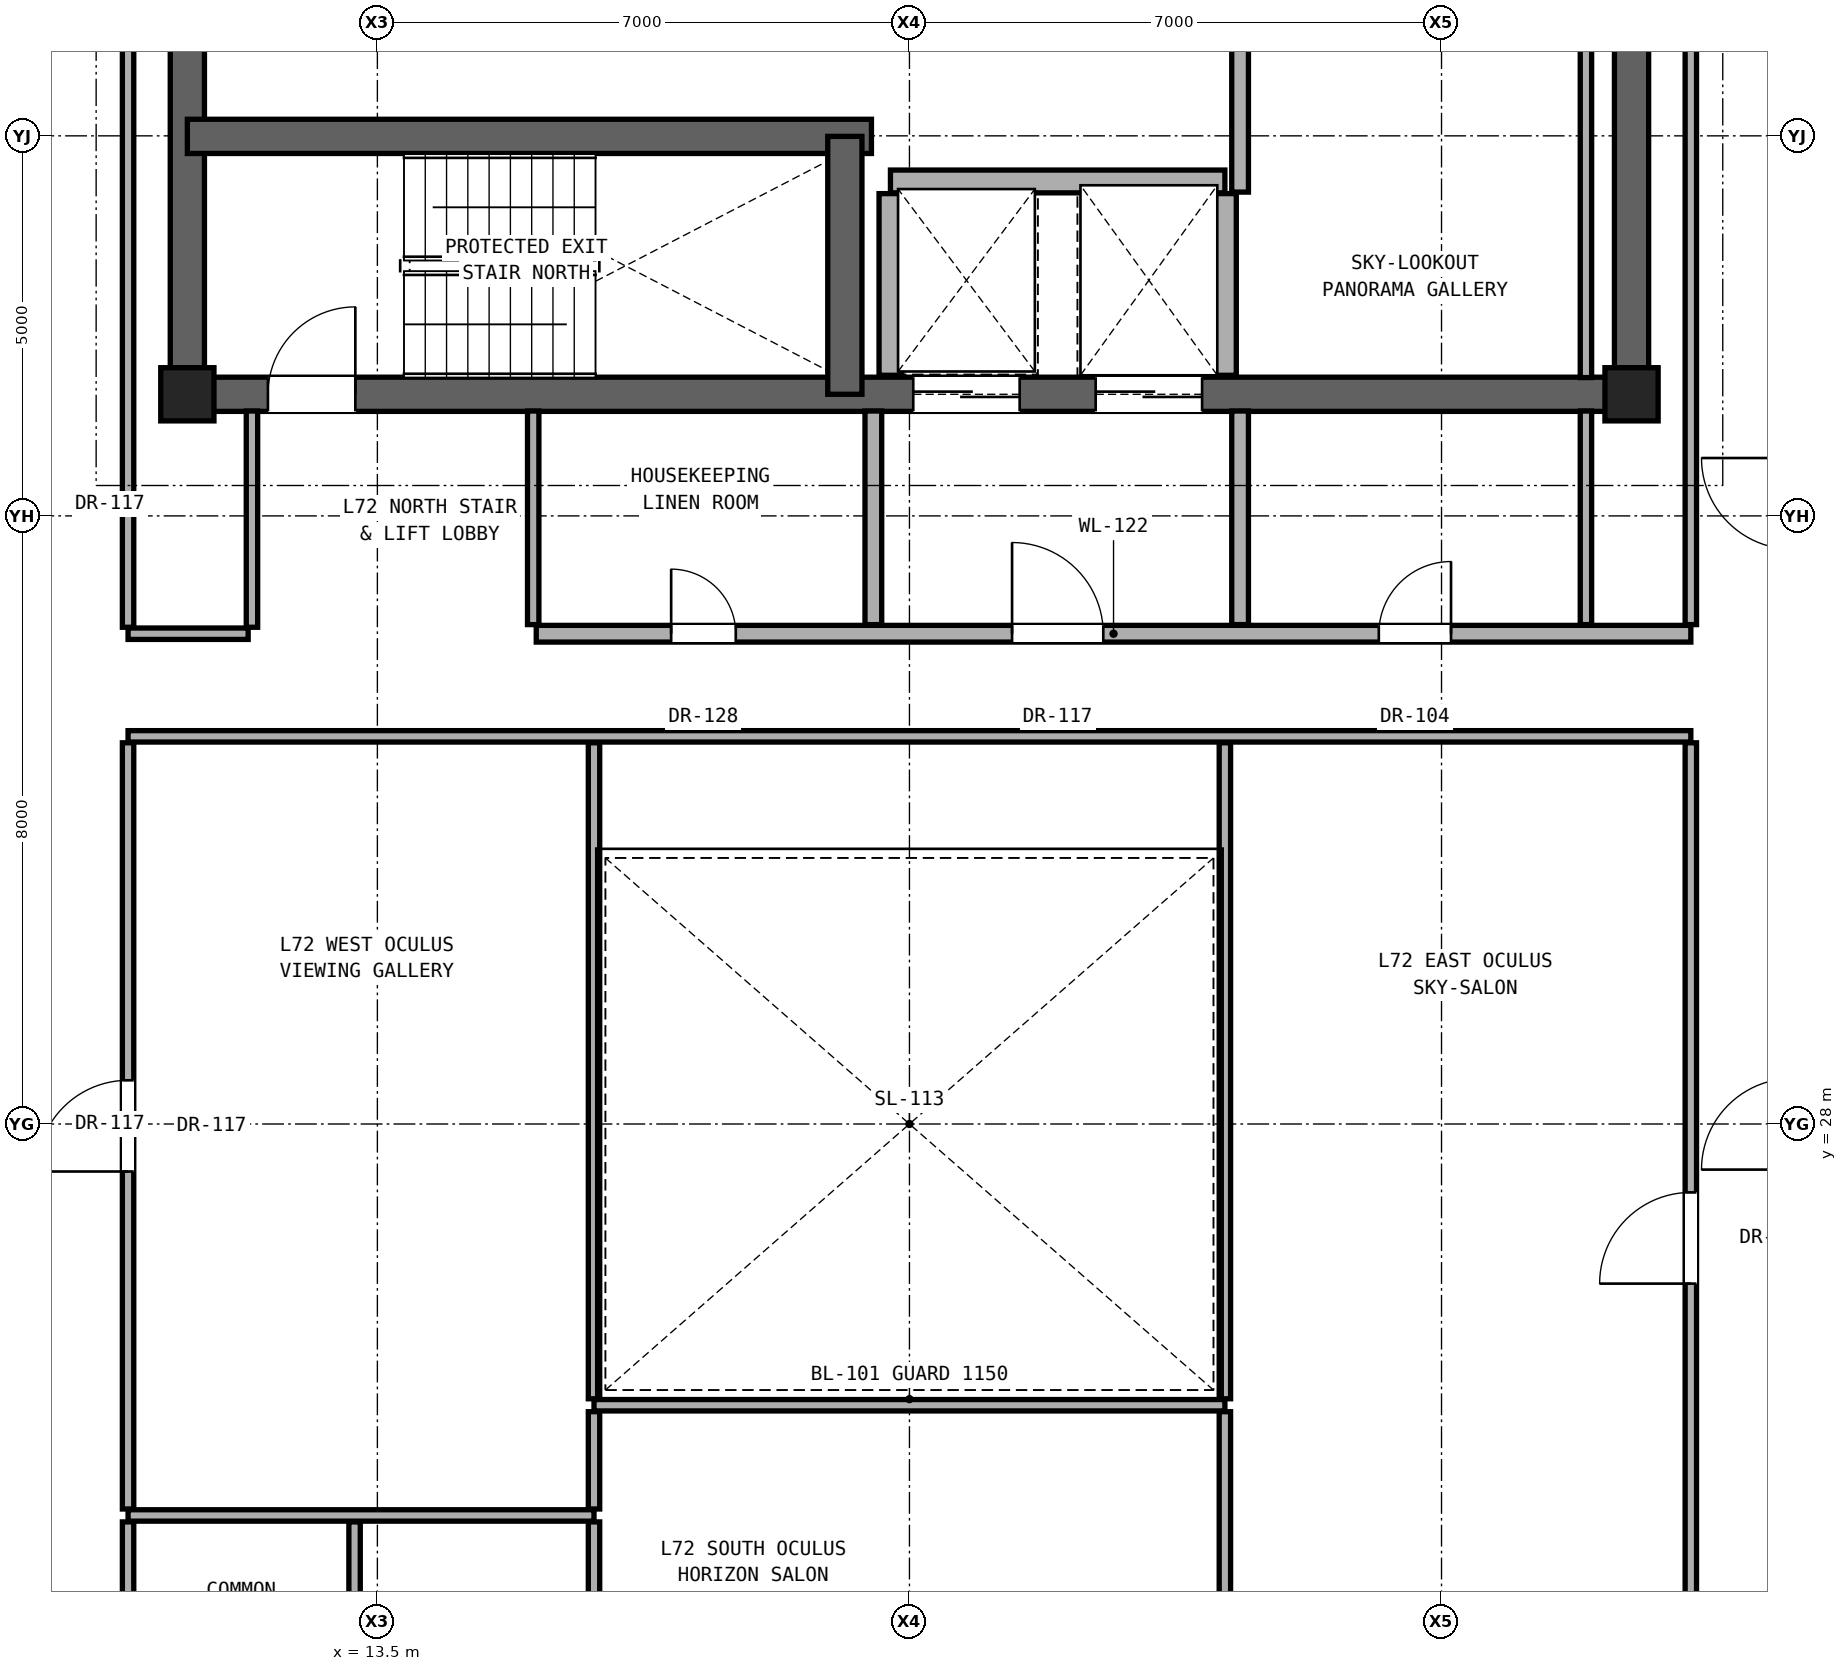
"""IFC4 building model, lengths in metres.
Left out: names, types, materials, properties, quantities, classifications, styles, units other than length and angle.
Written with IfcOpenShell. Run it as: python <this file> out.ifc"""

import sys

from ifc_helpers import new_model, si_unit, direction, frame, frame_2d, origin, origin_2d, place, context, subcontext, project, spatial, rectangle, extrude, element, fill, save


model = new_model("IFC4")
c1 = context("Model", 3, precision=1e-05, world=origin(), true_north=direction((0.0, 1.0)))
c2 = subcontext(c1, "Body", "Model", "MODEL_VIEW")
j1 = project(units=[si_unit("LENGTHUNIT", "METRE"), si_unit("PLANEANGLEUNIT", "RADIAN")], contexts=[c1])
p1 = place(None, origin())
s1 = spatial("IfcSite", under=j1, at=p1, CompositionType="ELEMENT")
p2 = place(p1, origin())
s2 = spatial("IfcBuilding", under=s1, at=p2, CompositionType="ELEMENT")
p3 = place(p2, frame((0.0, 0.0, 252.7)))
s3 = spatial("IfcBuildingStorey", under=s2, at=p3, CompositionType="ELEMENT", Elevation=252.7)
for number, where, z_axis, x_axis in (
    (1, (11.0, 37.6, 0.0), (0.0, 0.0, 1.0), (1.0, 0.0, 0.0)),
    (2, (30.0, 37.6, 0.0), (0.0, 0.0, 1.0), (1.0, 0.0, 0.0)),
):
    element("IfcColumn", number, at=place(p3, frame(where, z_axis=z_axis, x_axis=x_axis)), inside=s3, PredefinedType="COLUMN", context=c2, shape_type="SweptSolid", body=[
        extrude(rectangle(XDim=0.7, YDim=0.7, at=origin_2d()), origin(), (0.0, 0.0, 1.0), 3.6),
    ])
for number, where, z_axis, x_axis in (
    (3, (11.0, 37.6, 0.0), (0.0, 0.0, 1.0), (0.0, 1.0, 0.0)),
    (4, (30.0, 37.6, 0.0), (0.0, 0.0, 1.0), (0.0, 1.0, 0.0)),
):
    element("IfcWall", number, at=place(p3, frame(where, z_axis=z_axis, x_axis=x_axis)), inside=s3, PredefinedType="SHEAR", context=c2, shape_type="SweptSolid", body=[
        extrude(rectangle(XDim=6.0, YDim=0.45, at=frame_2d((3.0, 0.0))), origin(), (0.0, 0.0, 1.0), 3.4),
    ])
p4 = place(p3, frame((11.0, 37.6, 0.0), z_axis=(0.0, 0.0, 1.0), x_axis=(1.0, 0.0, 0.0)))
e5 = element("IfcWall", 5, at=p4, inside=s3, PredefinedType="SHEAR", context=c2, shape_type="SweptSolid", body=[
    extrude(rectangle(XDim=19.0, YDim=0.45, at=frame_2d((9.5, 0.0))), origin(), (0.0, 0.0, 1.0), 3.4),
])
p5 = place(p4, frame((1.06, 0.0, 0.0)))
e6 = element("IfcOpeningElement", 6, at=p5, cuts=e5, PredefinedType="OPENING", context=c2, shape_type="SweptSolid", body=[
    extrude(rectangle(XDim=1.15, YDim=2.2, at=frame_2d((0.575, 1.1))), frame((0.0, 0.235, 0.0), z_axis=(0.0, -1.0, 0.0), x_axis=(1.0, 0.0, 0.0)), (0.0, 0.0, 1.0), 0.47),
])
p6 = place(p4, frame((9.55, 0.0, 0.0)))
e7 = element("IfcOpeningElement", 7, at=p6, cuts=e5, PredefinedType="OPENING", context=c2, shape_type="SweptSolid", body=[
    extrude(rectangle(XDim=1.4, YDim=2.35, at=frame_2d((0.7, 1.175))), frame((0.0, 0.235, 0.0), z_axis=(0.0, -1.0, 0.0), x_axis=(1.0, 0.0, 0.0)), (0.0, 0.0, 1.0), 0.47),
])
p7 = place(p4, frame((11.95, 0.0, 0.0)))
e8 = element("IfcOpeningElement", 8, at=p7, cuts=e5, PredefinedType="OPENING", context=c2, shape_type="SweptSolid", body=[
    extrude(rectangle(XDim=1.4, YDim=2.35, at=frame_2d((0.7, 1.175))), frame((0.0, 0.235, 0.0), z_axis=(0.0, -1.0, 0.0), x_axis=(1.0, 0.0, 0.0)), (0.0, 0.0, 1.0), 0.47),
])
p8 = place(p3, frame((11.0, 40.993, 0.0), z_axis=(0.0, 0.0, 1.0), x_axis=(1.0, 0.0, 0.0)))
e9 = element("IfcWall", 9, at=p8, inside=s3, PredefinedType="SHEAR", context=c2, shape_type="SweptSolid", body=[
    extrude(rectangle(XDim=9.0, YDim=0.45, at=frame_2d((4.5, 0.0))), origin(), (0.0, 0.0, 1.0), 3.4),
])
p9 = place(p3, frame((19.65, 37.6, 0.0), z_axis=(0.0, 0.0, 1.0), x_axis=(0.0, 1.0, 0.0)))
e10 = element("IfcWall", 10, at=p9, inside=s3, PredefinedType="SHEAR", context=c2, shape_type="SweptSolid", body=[
    extrude(rectangle(XDim=3.393, YDim=0.45, at=frame_2d((1.696, 0.0))), origin(), (0.0, 0.0, 1.0), 3.4),
])
p10 = place(p3, frame((10.22, 22.85, 0.0), z_axis=(0.0, 0.0, 1.0), x_axis=(1.0, 0.0, 0.0)))
e11 = element("IfcWall", 11, at=p10, inside=s3, PredefinedType="PARTITIONING", context=c2, shape_type="SweptSolid", body=[
    extrude(rectangle(XDim=6.13, YDim=0.15, at=frame_2d((3.065, 0.0))), origin(), (0.0, 0.0, 1.0), 2.536),
])
p11 = place(p3, frame((16.35, 24.3, 0.0), z_axis=(0.0, 0.0, 1.0), x_axis=(1.0, 0.0, 0.0)))
e12 = element("IfcWall", 12, at=p11, inside=s3, PredefinedType="PARTITIONING", context=c2, shape_type="SweptSolid", body=[
    extrude(rectangle(XDim=8.3, YDim=0.15, at=frame_2d((4.15, 0.0))), origin(), (0.0, 0.0, 1.0), 2.975),
])
p12 = place(p3, frame((10.22, 33.1, 0.0), z_axis=(0.0, 0.0, 1.0), x_axis=(1.0, 0.0, 0.0)))
e13 = element("IfcWall", 13, at=p12, inside=s3, PredefinedType="PARTITIONING", context=c2, shape_type="SweptSolid", body=[
    extrude(rectangle(XDim=20.56, YDim=0.15, at=frame_2d((10.28, 0.0))), origin(), (0.0, 0.0, 1.0), 2.536),
])
p13 = place(p3, frame((10.22, 34.45, 0.0), z_axis=(0.0, 0.0, 1.0), x_axis=(1.0, 0.0, 0.0)))
e14 = element("IfcWall", 14, at=p13, inside=s3, PredefinedType="PARTITIONING", context=c2, shape_type="SweptSolid", body=[
    extrude(rectangle(XDim=1.58, YDim=0.15, at=frame_2d((0.79, 0.0))), origin(), (0.0, 0.0, 1.0), 2.536),
])
p14 = place(p3, frame((15.59, 34.45, 0.0), z_axis=(0.0, 0.0, 1.0), x_axis=(1.0, 0.0, 0.0)))
e15 = element("IfcWall", 15, at=p14, inside=s3, PredefinedType="SOLIDWALL", context=c2, shape_type="SweptSolid", body=[
    extrude(rectangle(XDim=15.19, YDim=0.22, at=frame_2d((7.595, 0.0))), origin(), (0.0, 0.0, 1.0), 2.536),
])
p15 = place(p14, frame((6.26, 0.0, 0.0)))
e16 = element("IfcOpeningElement", 16, at=p15, cuts=e15, PredefinedType="OPENING", context=c2, shape_type="SweptSolid", body=[
    extrude(rectangle(XDim=1.2, YDim=2.25, at=frame_2d((0.6, 1.125))), frame((0.0, 0.12, 0.0), z_axis=(0.0, -1.0, 0.0), x_axis=(1.0, 0.0, 0.0)), (0.0, 0.0, 1.0), 0.24),
])
p16 = place(p14, frame((11.085, 0.0, 0.0)))
e17 = element("IfcOpeningElement", 17, at=p16, cuts=e15, PredefinedType="OPENING", context=c2, shape_type="SweptSolid", body=[
    extrude(rectangle(XDim=0.95, YDim=2.15, at=frame_2d((0.475, 1.075))), frame((0.0, 0.12, 0.0), z_axis=(0.0, -1.0, 0.0), x_axis=(1.0, 0.0, 0.0)), (0.0, 0.0, 1.0), 0.24),
])
p17 = place(p14, frame((1.775, 0.0, 0.0)))
e18 = element("IfcOpeningElement", 18, at=p17, cuts=e15, PredefinedType="OPENING", context=c2, shape_type="SweptSolid", body=[
    extrude(rectangle(XDim=0.85, YDim=2.01, at=frame_2d((0.425, 1.005))), frame((0.0, 0.12, 0.0), z_axis=(0.0, -1.0, 0.0), x_axis=(1.0, 0.0, 0.0)), (0.0, 0.0, 1.0), 0.24),
])
p18 = place(p3, frame((20.25, 40.4, 0.0), z_axis=(0.0, 0.0, 1.0), x_axis=(1.0, 0.0, 0.0)))
e19 = element("IfcWall", 19, at=p18, inside=s3, PredefinedType="SOLIDWALL", context=c2, shape_type="SweptSolid", body=[
    extrude(rectangle(XDim=4.4, YDim=0.3, at=frame_2d((2.2, 0.0))), origin(), (0.0, 0.0, 1.0), 3.4),
])
p19 = place(p3, frame((10.22, 19.985, 0.0), z_axis=(0.0, 0.0, 1.0), x_axis=(0.0, 1.0, 0.0)))
e20 = element("IfcWall", 20, at=p19, inside=s3, PredefinedType="PARTITIONING", context=c2, shape_type="SweptSolid", body=[
    extrude(rectangle(XDim=2.78, YDim=0.15, at=frame_2d((1.39, 0.0))), origin(), (0.0, 0.0, 1.0), 3.4),
])
p20 = place(p3, frame((10.22, 22.935, 0.0), z_axis=(0.0, 0.0, 1.0), x_axis=(0.0, 1.0, 0.0)))
e21 = element("IfcWall", 21, at=p20, inside=s3, PredefinedType="PARTITIONING", context=c2, shape_type="SweptSolid", body=[
    extrude(rectangle(XDim=10.08, YDim=0.15, at=frame_2d((5.04, 0.0))), origin(), (0.0, 0.0, 1.0), 2.696),
])
p21 = place(p20, frame((4.44, 0.0, 0.0)))
e22 = element("IfcOpeningElement", 22, at=p21, cuts=e21, PredefinedType="OPENING", context=c2, shape_type="SweptSolid", body=[
    extrude(rectangle(XDim=1.2, YDim=2.25, at=frame_2d((0.6, 1.125))), frame((0.0, 0.085, 0.0), z_axis=(0.0, -1.0, 0.0), x_axis=(1.0, 0.0, 0.0)), (0.0, 0.0, 1.0), 0.17),
])
p22 = place(p3, frame((10.22, 34.535, 0.0), z_axis=(0.0, 0.0, 1.0), x_axis=(0.0, 1.0, 0.0)))
e23 = element("IfcWall", 23, at=p22, inside=s3, PredefinedType="PARTITIONING", context=c2, shape_type="SweptSolid", body=[
    extrude(rectangle(XDim=9.13, YDim=0.15, at=frame_2d((4.565, 0.0))), origin(), (0.0, 0.0, 1.0), 2.792),
])
p23 = place(p3, frame((11.85, 34.535, 0.0), z_axis=(0.0, 0.0, 1.0), x_axis=(0.0, 1.0, 0.0)))
e24 = element("IfcWall", 24, at=p23, inside=s3, PredefinedType="PARTITIONING", context=c2, shape_type="SweptSolid", body=[
    extrude(rectangle(XDim=2.845, YDim=0.15, at=frame_2d((1.422, 0.0))), origin(), (0.0, 0.0, 1.0), 3.4),
])
p24 = place(p3, frame((13.2, 19.985, 0.0), z_axis=(0.0, 0.0, 1.0), x_axis=(0.0, 1.0, 0.0)))
e25 = element("IfcWall", 25, at=p24, inside=s3, PredefinedType="PARTITIONING", context=c2, shape_type="SweptSolid", body=[
    extrude(rectangle(XDim=2.78, YDim=0.15, at=frame_2d((1.39, 0.0))), origin(), (0.0, 0.0, 1.0), 3.4),
])
p25 = place(p3, frame((15.55, 34.57, 0.0), z_axis=(0.0, 0.0, 1.0), x_axis=(0.0, 1.0, 0.0)))
e26 = element("IfcWall", 26, at=p25, inside=s3, PredefinedType="PARTITIONING", context=c2, shape_type="SweptSolid", body=[
    extrude(rectangle(XDim=2.81, YDim=0.15, at=frame_2d((1.405, 0.0))), origin(), (0.0, 0.0, 1.0), 3.4),
])
p26 = place(p3, frame((16.35, 19.985, 0.0), z_axis=(0.0, 0.0, 1.0), x_axis=(0.0, 1.0, 0.0)))
e27 = element("IfcWall", 27, at=p26, inside=s3, PredefinedType="PARTITIONING", context=c2, shape_type="SweptSolid", body=[
    extrude(rectangle(XDim=2.78, YDim=0.15, at=frame_2d((1.39, 0.0))), origin(), (0.0, 0.0, 1.0), 3.4),
])
p27 = place(p3, frame((16.35, 22.935, 0.0), z_axis=(0.0, 0.0, 1.0), x_axis=(0.0, 1.0, 0.0)))
e28 = element("IfcWall", 28, at=p27, inside=s3, PredefinedType="PARTITIONING", context=c2, shape_type="SweptSolid", body=[
    extrude(rectangle(XDim=1.28, YDim=0.15, at=frame_2d((0.64, 0.0))), origin(), (0.0, 0.0, 1.0), 3.4),
])
p28 = place(p3, frame((16.35, 24.385, 0.0), z_axis=(0.0, 0.0, 1.0), x_axis=(0.0, 1.0, 0.0)))
e29 = element("IfcWall", 29, at=p28, inside=s3, PredefinedType="PARTITIONING", context=c2, shape_type="SweptSolid", body=[
    extrude(rectangle(XDim=8.63, YDim=0.15, at=frame_2d((4.315, 0.0))), origin(), (0.0, 0.0, 1.0), 2.536),
])
p29 = place(p3, frame((20.025, 34.57, 0.0), z_axis=(0.0, 0.0, 1.0), x_axis=(0.0, 1.0, 0.0)))
e30 = element("IfcWall", 30, at=p29, inside=s3, PredefinedType="SOLIDWALL", context=c2, shape_type="SweptSolid", body=[
    extrude(rectangle(XDim=2.81, YDim=0.22, at=frame_2d((1.405, 0.0))), origin(), (0.0, 0.0, 1.0), 3.4),
])
p30 = place(p3, frame((20.25, 37.85, 0.0), z_axis=(0.0, 0.0, 1.0), x_axis=(0.0, 1.0, 0.0)))
e31 = element("IfcWall", 31, at=p30, inside=s3, PredefinedType="SOLIDWALL", context=c2, shape_type="SweptSolid", body=[
    extrude(rectangle(XDim=2.39, YDim=0.3, at=frame_2d((1.195, 0.0))), origin(), (0.0, 0.0, 1.0), 3.4),
])
p31 = place(p3, frame((24.65, 19.985, 0.0), z_axis=(0.0, 0.0, 1.0), x_axis=(0.0, 1.0, 0.0)))
e32 = element("IfcWall", 32, at=p31, inside=s3, PredefinedType="PARTITIONING", context=c2, shape_type="SweptSolid", body=[
    extrude(rectangle(XDim=4.23, YDim=0.15, at=frame_2d((2.115, 0.0))), origin(), (0.0, 0.0, 1.0), 3.4),
])
p32 = place(p3, frame((24.65, 24.385, 0.0), z_axis=(0.0, 0.0, 1.0), x_axis=(0.0, 1.0, 0.0)))
e33 = element("IfcWall", 33, at=p32, inside=s3, PredefinedType="PARTITIONING", context=c2, shape_type="SweptSolid", body=[
    extrude(rectangle(XDim=8.63, YDim=0.15, at=frame_2d((4.315, 0.0))), origin(), (0.0, 0.0, 1.0), 2.536),
])
p33 = place(p3, frame((24.65, 37.85, 0.0), z_axis=(0.0, 0.0, 1.0), x_axis=(0.0, 1.0, 0.0)))
e34 = element("IfcWall", 34, at=p33, inside=s3, PredefinedType="SOLIDWALL", context=c2, shape_type="SweptSolid", body=[
    extrude(rectangle(XDim=2.39, YDim=0.3, at=frame_2d((1.195, 0.0))), origin(), (0.0, 0.0, 1.0), 3.4),
])
p34 = place(p3, frame((24.85, 34.57, 0.0), z_axis=(0.0, 0.0, 1.0), x_axis=(0.0, 1.0, 0.0)))
e35 = element("IfcWall", 35, at=p34, inside=s3, PredefinedType="SOLIDWALL", context=c2, shape_type="SweptSolid", body=[
    extrude(rectangle(XDim=2.81, YDim=0.22, at=frame_2d((1.405, 0.0))), origin(), (0.0, 0.0, 1.0), 3.4),
])
p35 = place(p3, frame((24.85, 40.26, 0.0), z_axis=(0.0, 0.0, 1.0), x_axis=(0.0, 1.0, 0.0)))
e36 = element("IfcWall", 36, at=p35, inside=s3, PredefinedType="SOLIDWALL", context=c2, shape_type="SweptSolid", body=[
    extrude(rectangle(XDim=2.855, YDim=0.22, at=frame_2d((1.427, 0.0))), origin(), (0.0, 0.0, 1.0), 3.4),
])
p36 = place(p3, frame((29.4, 34.57, 0.0), z_axis=(0.0, 0.0, 1.0), x_axis=(0.0, 1.0, 0.0)))
e37 = element("IfcWall", 37, at=p36, inside=s3, PredefinedType="PARTITIONING", context=c2, shape_type="SweptSolid", body=[
    extrude(rectangle(XDim=2.81, YDim=0.15, at=frame_2d((1.405, 0.0))), origin(), (0.0, 0.0, 1.0), 3.4),
])
p37 = place(p3, frame((29.4, 37.82, 0.0), z_axis=(0.0, 0.0, 1.0), x_axis=(0.0, 1.0, 0.0)))
e38 = element("IfcWall", 38, at=p37, inside=s3, PredefinedType="PARTITIONING", context=c2, shape_type="SweptSolid", body=[
    extrude(rectangle(XDim=5.295, YDim=0.15, at=frame_2d((2.647, 0.0))), origin(), (0.0, 0.0, 1.0), 3.4),
])
p38 = place(p3, frame((30.78, 19.985, 0.0), z_axis=(0.0, 0.0, 1.0), x_axis=(0.0, 1.0, 0.0)))
e39 = element("IfcWall", 39, at=p38, inside=s3, PredefinedType="PARTITIONING", context=c2, shape_type="SweptSolid", body=[
    extrude(rectangle(XDim=13.03, YDim=0.15, at=frame_2d((6.515, 0.0))), origin(), (0.0, 0.0, 1.0), 2.696),
])
p39 = place(p38, frame((5.915, 0.0, 0.0)))
e40 = element("IfcOpeningElement", 40, at=p39, cuts=e39, PredefinedType="OPENING", context=c2, shape_type="SweptSolid", body=[
    extrude(rectangle(XDim=1.2, YDim=2.25, at=frame_2d((0.6, 1.125))), frame((0.0, 0.085, 0.0), z_axis=(0.0, -1.0, 0.0), x_axis=(1.0, 0.0, 0.0)), (0.0, 0.0, 1.0), 0.17),
])
p40 = place(p3, frame((30.78, 34.57, 0.0), z_axis=(0.0, 0.0, 1.0), x_axis=(0.0, 1.0, 0.0)))
e41 = element("IfcWall", 41, at=p40, inside=s3, PredefinedType="PARTITIONING", context=c2, shape_type="SweptSolid", body=[
    extrude(rectangle(XDim=9.095, YDim=0.15, at=frame_2d((4.547, 0.0))), origin(), (0.0, 0.0, 1.0), 2.792),
])
p41 = place(p5, origin())
e42 = element("IfcDoor", 42, at=p41, inside=s3, OperationType="SINGLE_SWING_RIGHT", PredefinedType="DOOR", context=c2, shape_type="SweptSolid", body=[
    extrude(rectangle(XDim=1.15, YDim=2.2, at=frame_2d((0.575, 1.1))), frame((0.0, 0.025, 0.0), z_axis=(0.0, -1.0, 0.0), x_axis=(1.0, 0.0, 0.0)), (0.0, 0.0, 1.0), 0.05),
])
fill(e6, e42)
p42 = place(p15, origin())
e43 = element("IfcDoor", 43, at=p42, inside=s3, OperationType="SINGLE_SWING_LEFT", PredefinedType="DOOR", context=c2, shape_type="SweptSolid", body=[
    extrude(rectangle(XDim=1.2, YDim=2.25, at=frame_2d((0.6, 1.125))), frame((0.0, 0.025, 0.0), z_axis=(0.0, -1.0, 0.0), x_axis=(1.0, 0.0, 0.0)), (0.0, 0.0, 1.0), 0.05),
])
fill(e16, e43)
p43 = place(p16, origin())
e44 = element("IfcDoor", 44, at=p43, inside=s3, OperationType="SINGLE_SWING_RIGHT", PredefinedType="DOOR", context=c2, shape_type="SweptSolid", body=[
    extrude(rectangle(XDim=0.95, YDim=2.15, at=frame_2d((0.475, 1.075))), frame((0.0, 0.025, 0.0), z_axis=(0.0, -1.0, 0.0), x_axis=(1.0, 0.0, 0.0)), (0.0, 0.0, 1.0), 0.05),
])
fill(e17, e44)
p44 = place(p17, origin())
e45 = element("IfcDoor", 45, at=p44, inside=s3, OperationType="SINGLE_SWING_LEFT", PredefinedType="DOOR", context=c2, shape_type="SweptSolid", body=[
    extrude(rectangle(XDim=0.85, YDim=2.01, at=frame_2d((0.425, 1.005))), frame((0.0, 0.025, 0.0), z_axis=(0.0, -1.0, 0.0), x_axis=(1.0, 0.0, 0.0)), (0.0, 0.0, 1.0), 0.05),
])
fill(e18, e45)
p45 = place(p21, origin())
e46 = element("IfcDoor", 46, at=p45, inside=s3, OperationType="SINGLE_SWING_LEFT", PredefinedType="DOOR", context=c2, shape_type="SweptSolid", body=[
    extrude(rectangle(XDim=1.2, YDim=2.25, at=frame_2d((0.6, 1.125))), frame((0.0, 0.025, 0.0), z_axis=(0.0, -1.0, 0.0), x_axis=(1.0, 0.0, 0.0)), (0.0, 0.0, 1.0), 0.05),
])
fill(e22, e46)
p46 = place(p39, origin())
e47 = element("IfcDoor", 47, at=p46, inside=s3, OperationType="SINGLE_SWING_LEFT", PredefinedType="DOOR", context=c2, shape_type="SweptSolid", body=[
    extrude(rectangle(XDim=1.2, YDim=2.25, at=frame_2d((0.6, 1.125))), frame((0.0, 0.025, 0.0), z_axis=(0.0, -1.0, 0.0), x_axis=(1.0, 0.0, 0.0)), (0.0, 0.0, 1.0), 0.05),
])
fill(e40, e47)
p47 = place(p6, origin())
e48 = element("IfcDoor", 48, at=p47, inside=s3, OperationType="DOUBLE_DOOR_SLIDING", PredefinedType="DOOR", context=c2, shape_type="SweptSolid", body=[
    extrude(rectangle(XDim=1.4, YDim=2.35, at=frame_2d((0.7, 1.175))), frame((0.0, 0.025, 0.0), z_axis=(0.0, -1.0, 0.0), x_axis=(1.0, 0.0, 0.0)), (0.0, 0.0, 1.0), 0.05),
])
fill(e7, e48)
p48 = place(p7, origin())
e49 = element("IfcDoor", 49, at=p48, inside=s3, OperationType="DOUBLE_DOOR_SLIDING", PredefinedType="DOOR", context=c2, shape_type="SweptSolid", body=[
    extrude(rectangle(XDim=1.4, YDim=2.35, at=frame_2d((0.7, 1.175))), frame((0.0, 0.025, 0.0), z_axis=(0.0, -1.0, 0.0), x_axis=(1.0, 0.0, 0.0)), (0.0, 0.0, 1.0), 0.05),
])
fill(e8, e49)
save(model, sys.argv[1])
